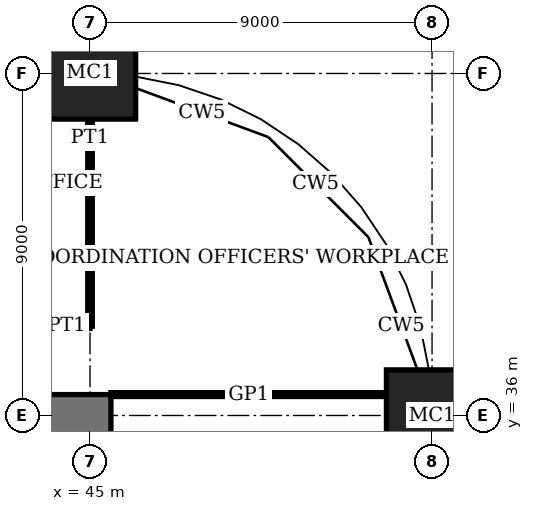
"""IFC4 building model, lengths in metres.
Left out: names, types, materials, properties, quantities, classifications, styles, units other than length and angle.
Written with IfcOpenShell. Run it as: python <this file> out.ifc"""

import sys

from ifc_helpers import new_model, si_unit, direction, frame, frame_2d, origin, origin_2d, place, context, subcontext, project, spatial, rectangle, extrude, element, save


model = new_model("IFC4")
c1 = context("Model", 3, precision=1e-05, world=origin(), true_north=direction((0.0, 1.0)))
c2 = subcontext(c1, "Body", "Model", "MODEL_VIEW")
j1 = project(units=[si_unit("LENGTHUNIT", "METRE"), si_unit("PLANEANGLEUNIT", "RADIAN")], contexts=[c1])
p1 = place(None, origin())
s1 = spatial("IfcSite", under=j1, at=p1, CompositionType="ELEMENT")
p2 = place(p1, origin())
s2 = spatial("IfcBuilding", under=s1, at=p2, CompositionType="ELEMENT")
p3 = place(p2, frame((0.0, 0.0, 247.4)))
s3 = spatial("IfcBuildingStorey", under=s2, at=p3, CompositionType="ELEMENT", Elevation=247.4)
for number, where, z_axis, x_axis in (
    (1, (45.0, 45.0, 0.0), (0.0, 0.0, 1.0), (1.0, 0.0, 0.0)),
    (2, (54.0, 36.0, 0.0), (0.0, 0.0, 1.0), (1.0, 0.0, 0.0)),
):
    element("IfcColumn", number, at=place(p3, frame(where, z_axis=z_axis, x_axis=x_axis)), inside=s3, PredefinedType="COLUMN", context=c2, shape_type="SweptSolid", body=[
        extrude(rectangle(XDim=2.4, YDim=2.4, at=origin_2d()), origin(), (0.0, 0.0, 1.0), 4.0),
    ])
p4 = place(p3, frame((45.55, 36.0, 0.0), z_axis=(0.0, 0.0, 1.0), x_axis=(-1.0, 0.0, 0.0)))
e3 = element("IfcWall", 3, at=p4, inside=s3, PredefinedType="SHEAR", context=c2, shape_type="SweptSolid", body=[
    extrude(rectangle(XDim=28.1, YDim=1.1, at=frame_2d((14.05, 0.0))), origin(), (0.0, 0.0, 1.0), 4.0),
])
p5 = place(p4, frame((11.55, 0.0, 0.0)))
e4 = element("IfcOpeningElement", 4, at=p5, cuts=e3, PredefinedType="OPENING", context=c2, shape_type="SweptSolid", body=[
    extrude(rectangle(XDim=1.0, YDim=2.4, at=frame_2d((0.5, 1.2))), frame((0.0, 0.56, 0.0), z_axis=(0.0, -1.0, 0.0), x_axis=(1.0, 0.0, 0.0)), (0.0, 0.0, 1.0), 1.12),
])
p6 = place(p4, frame((16.55, 0.0, 0.0)))
e5 = element("IfcOpeningElement", 5, at=p6, cuts=e3, PredefinedType="OPENING", context=c2, shape_type="SweptSolid", body=[
    extrude(rectangle(XDim=1.0, YDim=2.4, at=frame_2d((0.5, 1.2))), frame((0.0, 0.56, 0.0), z_axis=(0.0, -1.0, 0.0), x_axis=(1.0, 0.0, 0.0)), (0.0, 0.0, 1.0), 1.12),
])
p7 = place(p4, frame((20.0, 0.0, 0.0)))
e6 = element("IfcOpeningElement", 6, at=p7, cuts=e3, PredefinedType="OPENING", context=c2, shape_type="SweptSolid", body=[
    extrude(rectangle(XDim=1.1, YDim=2.4, at=frame_2d((0.55, 1.2))), frame((0.0, 0.56, 0.0), z_axis=(0.0, -1.0, 0.0), x_axis=(1.0, 0.0, 0.0)), (0.0, 0.0, 1.0), 1.12),
])
p8 = place(p4, frame((24.05, 0.0, 0.0)))
e7 = element("IfcOpeningElement", 7, at=p8, cuts=e3, PredefinedType="OPENING", context=c2, shape_type="SweptSolid", body=[
    extrude(rectangle(XDim=1.0, YDim=2.4, at=frame_2d((0.5, 1.2))), frame((0.0, 0.56, 0.0), z_axis=(0.0, -1.0, 0.0), x_axis=(1.0, 0.0, 0.0)), (0.0, 0.0, 1.0), 1.12),
])
p9 = place(p3, frame((45.55, 36.55, 0.0), z_axis=(0.0, 0.0, 1.0), x_axis=(1.0, 0.0, 0.0)))
e8 = element("IfcWall", 8, at=p9, inside=s3, PredefinedType="PARTITIONING", context=c2, shape_type="SweptSolid", body=[
    extrude(rectangle(XDim=7.25, YDim=0.1, at=frame_2d((3.625, 0.0))), origin(), (0.0, 0.0, 1.0), 3.75),
])
p10 = place(p3, frame((40.5, 38.35, 0.0), z_axis=(0.0, 0.0, 1.0), x_axis=(1.0, 0.0, 0.0)))
e9 = element("IfcWall", 9, at=p10, inside=s3, PredefinedType="PARTITIONING", context=c2, shape_type="SweptSolid", body=[
    extrude(rectangle(XDim=4.5, YDim=0.12, at=frame_2d((2.25, 0.0))), origin(), (0.0, 0.0, 1.0), 3.75),
])
p11 = place(p10, frame((1.75, 0.0, 0.0)))
e10 = element("IfcOpeningElement", 10, at=p11, cuts=e9, PredefinedType="OPENING", context=c2, shape_type="SweptSolid", body=[
    extrude(rectangle(XDim=1.0, YDim=2.4, at=frame_2d((0.5, 1.2))), frame((0.0, 0.07, 0.0), z_axis=(0.0, -1.0, 0.0), x_axis=(1.0, 0.0, 0.0)), (0.0, 0.0, 1.0), 0.14),
])
p12 = place(p3, frame((45.0, 38.35, 0.0), z_axis=(0.0, 0.0, 1.0), x_axis=(0.0, 1.0, 0.0)))
e11 = element("IfcWall", 11, at=p12, inside=s3, PredefinedType="PARTITIONING", context=c2, shape_type="SweptSolid", body=[
    extrude(rectangle(XDim=5.45, YDim=0.12, at=frame_2d((2.725, 0.0))), origin(), (0.0, 0.0, 1.0), 3.05),
])
save(model, sys.argv[1])
